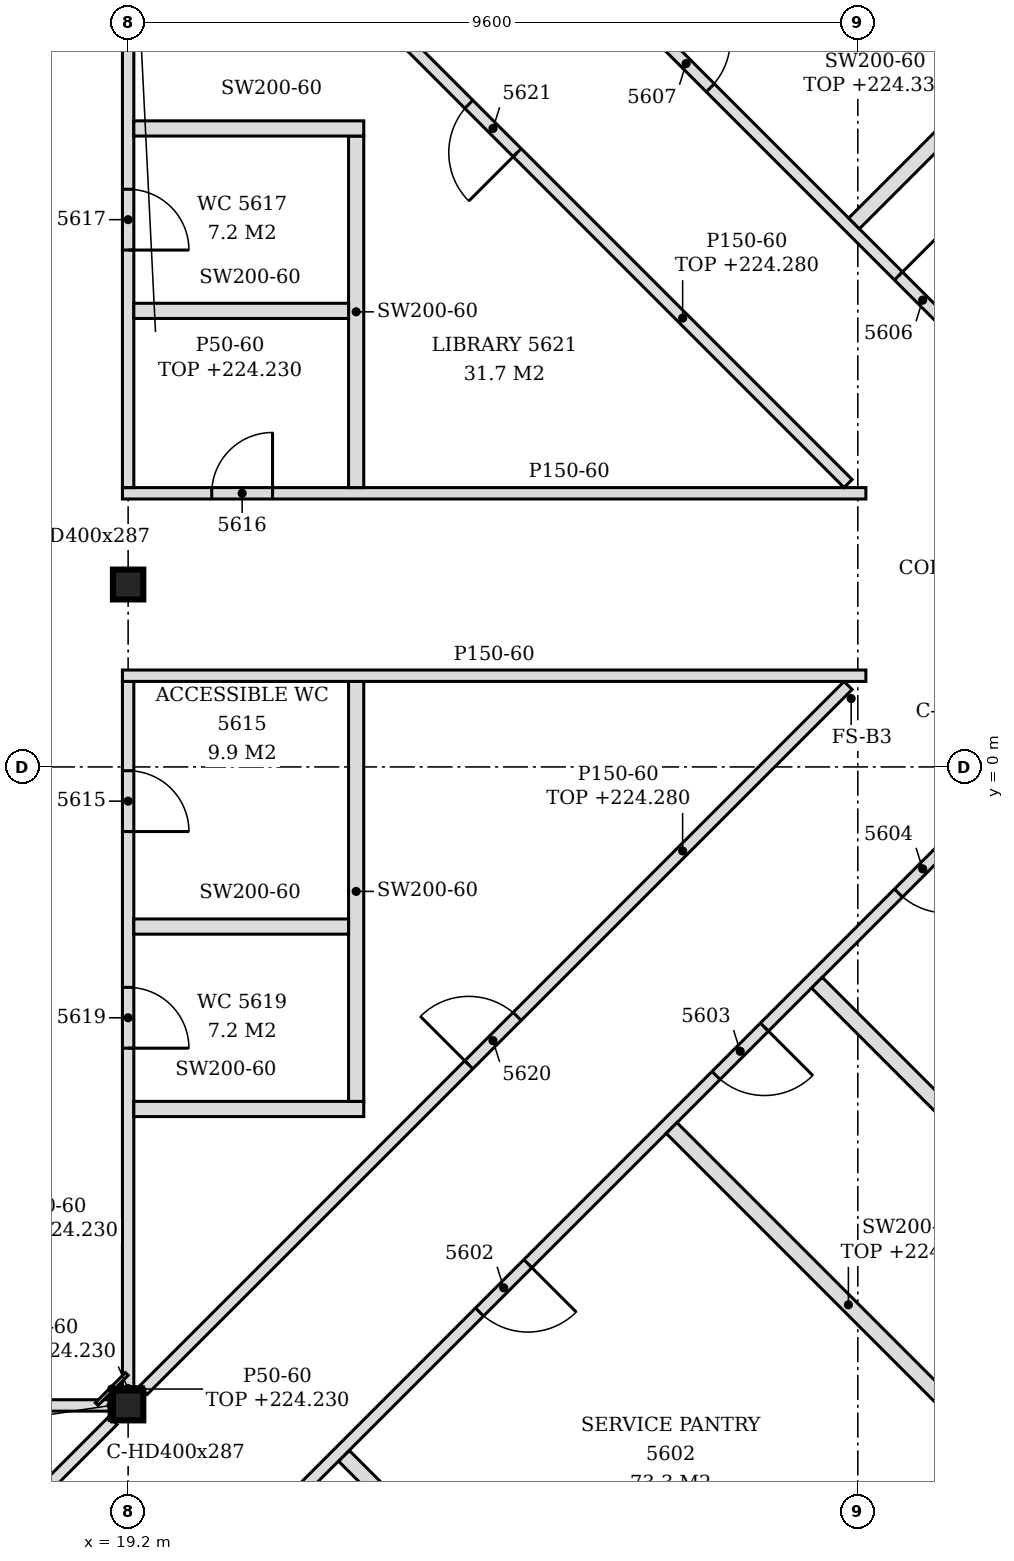
"""IFC4 building model, lengths in metres.
Left out: names, types, materials, properties, quantities, classifications, styles, units other than length and angle.
Written with IfcOpenShell. Run it as: python <this file> out.ifc"""

import sys

from ifc_helpers import new_model, si_unit, direction, frame, frame_2d, origin, origin_2d, place, context, subcontext, project, spatial, polyline, rectangle, i_section, outline, extrude, element, fill, save


model = new_model("IFC4")
c1 = context("Model", 3, precision=1e-05, world=origin(), true_north=direction((0.0, 1.0)))
c2 = subcontext(c1, "Body", "Model", "MODEL_VIEW")
j1 = project(units=[si_unit("LENGTHUNIT", "METRE"), si_unit("PLANEANGLEUNIT", "RADIAN")], contexts=[c1])
p1 = place(None, origin())
s1 = spatial("IfcSite", under=j1, at=p1, CompositionType="ELEMENT")
p2 = place(p1, origin())
s2 = spatial("IfcBuilding", under=s1, at=p2, CompositionType="ELEMENT")
p3 = place(p2, frame((0.0, 0.0, 221.4)))
s3 = spatial("IfcBuildingStorey", under=s2, at=p3, CompositionType="ELEMENT", Elevation=221.4)
for number, where, z_axis, x_axis in (
    (1, (19.2, -8.4, -0.15), (0.0, 0.0, 1.0), (1.0, 0.0, 0.0)),
    (2, (19.2, 2.4, -0.15), (0.0, 0.0, 1.0), (1.0, 0.0, 0.0)),
):
    element("IfcColumn", number, at=place(p3, frame(where, z_axis=z_axis, x_axis=x_axis)), inside=s3, PredefinedType="COLUMN", context=c2, shape_type="SweptSolid", body=[
        extrude(i_section(OverallWidth=0.399, OverallDepth=0.393, WebThickness=0.023, FlangeThickness=0.037, FilletRadius=0.015, at=origin_2d()), origin(), (0.0, 0.0, 1.0), 3.6),
    ])
p4 = place(p3, frame((29.636, -16.66, 0.0), z_axis=(0.0, 0.0, 1.0), x_axis=(-0.707095420673, 0.707118141518, 0.0)))
e3 = element("IfcWall", 3, at=p4, inside=s3, PredefinedType="PARTITIONING", context=c2, shape_type="SweptSolid", body=[
    extrude(rectangle(XDim=10.745, YDim=0.2, at=frame_2d((5.373, 0.0))), origin(), (0.0, 0.0, 1.0), 2.88),
])
p5 = place(p3, frame((16.722, -14.272, 0.0), z_axis=(0.0, 0.0, 1.0), x_axis=(0.707106781187, 0.707106781187, 0.0)))
e4 = element("IfcWall", 4, at=p5, inside=s3, PredefinedType="PARTITIONING", context=c2, shape_type="SweptSolid", body=[
    extrude(rectangle(XDim=20.049, YDim=0.15, at=frame_2d((10.025, 0.0))), origin(), (0.0, 0.0, 1.0), 2.73),
])
p6 = place(p5, frame((4.892, 0.0, 0.0)))
e5 = element("IfcOpeningElement", 5, at=p6, cuts=e4, PredefinedType="OPENING", context=c2, shape_type="SweptSolid", body=[
    extrude(rectangle(XDim=0.9, YDim=2.1, at=frame_2d((0.45, 1.05))), frame((0.0, 0.085, 0.0), z_axis=(0.0, -1.0, 0.0), x_axis=(1.0, 0.0, 0.0)), (0.0, 0.0, 1.0), 0.17),
])
p7 = place(p5, frame((10.042, 0.0, 0.0)))
e6 = element("IfcOpeningElement", 6, at=p7, cuts=e4, PredefinedType="OPENING", context=c2, shape_type="SweptSolid", body=[
    extrude(rectangle(XDim=0.9, YDim=2.1, at=frame_2d((0.45, 1.05))), frame((0.0, 0.085, 0.0), z_axis=(0.0, -1.0, 0.0), x_axis=(1.0, 0.0, 0.0)), (0.0, 0.0, 1.0), 0.17),
])
p8 = place(p5, frame((14.443, 0.0, 0.0)))
e7 = element("IfcOpeningElement", 7, at=p8, cuts=e4, PredefinedType="OPENING", context=c2, shape_type="SweptSolid", body=[
    extrude(rectangle(XDim=0.9, YDim=2.1, at=frame_2d((0.45, 1.05))), frame((0.0, 0.085, 0.0), z_axis=(0.0, -1.0, 0.0), x_axis=(1.0, 0.0, 0.0)), (0.0, 0.0, 1.0), 0.17),
])
p9 = place(p5, frame((17.837, 0.0, 0.0)))
e8 = element("IfcOpeningElement", 8, at=p9, cuts=e4, PredefinedType="OPENING", context=c2, shape_type="SweptSolid", body=[
    extrude(rectangle(XDim=0.9, YDim=2.1, at=frame_2d((0.45, 1.05))), frame((0.0, 0.085, 0.0), z_axis=(0.0, -1.0, 0.0), x_axis=(1.0, 0.0, 0.0)), (0.0, 0.0, 1.0), 0.17),
])
p10 = place(p3, frame((15.728, -11.872, 0.0), z_axis=(0.0, 0.0, 1.0), x_axis=(0.707080416772, 0.707133144618, 0.0)))
e9 = element("IfcWall", 9, at=p10, inside=s3, PredefinedType="PARTITIONING", context=c2, shape_type="SweptSolid", body=[
    extrude(rectangle(XDim=4.63, YDim=0.15, at=frame_2d((2.315, 0.0))), origin(), (0.0, 0.0, 1.0), 3.45),
])
p11 = place(p3, frame((35.86, -10.436, 0.0), z_axis=(0.0, 0.0, 1.0), x_axis=(-0.707106781187, 0.707106781187, 0.0)))
e10 = element("IfcWall", 10, at=p11, inside=s3, PredefinedType="PARTITIONING", context=c2, shape_type="SweptSolid", body=[
    extrude(rectangle(XDim=10.745, YDim=0.2, at=frame_2d((5.373, 0.0))), origin(), (0.0, 0.0, 1.0), 2.88),
])
p12 = place(p3, frame((31.002, -9.402, 0.0), z_axis=(0.0, 0.0, 1.0), x_axis=(-0.707088226093, 0.707125335793, 0.0)))
e11 = element("IfcWall", 11, at=p12, inside=s3, PredefinedType="PARTITIONING", context=c2, shape_type="SweptSolid", body=[
    extrude(rectangle(XDim=6.579, YDim=0.2, at=frame_2d((3.29, 0.0))), origin(), (0.0, 0.0, 1.0), 2.88),
])
p13 = place(p3, frame((7.399, -8.4, 0.0), z_axis=(0.0, 0.0, 1.0), x_axis=(1.0, 0.0, 0.0)))
e12 = element("IfcWall", 12, at=p13, inside=s3, PredefinedType="PARTITIONING", context=c2, shape_type="SweptSolid", body=[
    extrude(rectangle(XDim=11.601, YDim=0.15, at=frame_2d((5.801, 0.0))), origin(), (0.0, 0.0, 1.0), 2.83),
])
p14 = place(p13, frame((5.351, 0.0, 0.0)))
e13 = element("IfcOpeningElement", 13, at=p14, cuts=e12, PredefinedType="OPENING", context=c2, shape_type="SweptSolid", body=[
    extrude(rectangle(XDim=0.9, YDim=2.1, at=frame_2d((0.45, 1.05))), frame((0.0, 0.085, 0.0), z_axis=(0.0, -1.0, 0.0), x_axis=(1.0, 0.0, 0.0)), (0.0, 0.0, 1.0), 0.17),
])
p15 = place(p3, frame((19.2, -8.204, 0.0), z_axis=(0.0, 0.0, 1.0), x_axis=(0.0, 1.0, 0.0)))
e14 = element("IfcWall", 14, at=p15, inside=s3, PredefinedType="PARTITIONING", context=c2, shape_type="SweptSolid", body=[
    extrude(rectangle(XDim=9.329, YDim=0.15, at=frame_2d((4.664, 0.0))), origin(), (0.0, 0.0, 1.0), 2.83),
])
p16 = place(p15, frame((7.354, 0.0, 0.0)))
e15 = element("IfcOpeningElement", 15, at=p16, cuts=e14, PredefinedType="OPENING", context=c2, shape_type="SweptSolid", body=[
    extrude(rectangle(XDim=0.8, YDim=2.1, at=frame_2d((0.4, 1.05))), frame((0.0, 0.085, 0.0), z_axis=(0.0, -1.0, 0.0), x_axis=(1.0, 0.0, 0.0)), (0.0, 0.0, 1.0), 0.17),
])
p17 = place(p15, frame((4.503, 0.0, 0.0)))
e16 = element("IfcOpeningElement", 16, at=p17, cuts=e14, PredefinedType="OPENING", context=c2, shape_type="SweptSolid", body=[
    extrude(rectangle(XDim=0.8, YDim=2.1, at=frame_2d((0.4, 1.05))), frame((0.0, 0.085, 0.0), z_axis=(0.0, -1.0, 0.0), x_axis=(1.0, 0.0, 0.0)), (0.0, 0.0, 1.0), 0.17),
])
p18 = place(p3, frame((19.398, -8.202, 0.0), z_axis=(0.0, 0.0, 1.0), x_axis=(0.707116088468, 0.707097473782, 0.0)))
e17 = element("IfcWall", 17, at=p18, inside=s3, PredefinedType="PARTITIONING", context=c2, shape_type="SweptSolid", body=[
    extrude(rectangle(XDim=13.115, YDim=0.15, at=frame_2d((6.558, 0.0))), origin(), (0.0, 0.0, 1.0), 2.88),
])
p19 = place(p18, frame((6.058, 0.0, 0.0)))
e18 = element("IfcOpeningElement", 18, at=p19, cuts=e17, PredefinedType="OPENING", context=c2, shape_type="SweptSolid", body=[
    extrude(rectangle(XDim=0.9, YDim=2.1, at=frame_2d((0.45, 1.05))), frame((0.0, 0.085, 0.0), z_axis=(0.0, -1.0, 0.0), x_axis=(1.0, 0.0, 0.0)), (0.0, 0.0, 1.0), 0.17),
])
p20 = place(p3, frame((19.275, -4.5, 0.0), z_axis=(0.0, 0.0, 1.0), x_axis=(1.0, 0.0, 0.0)))
e19 = element("IfcWall", 19, at=p20, inside=s3, PredefinedType="PARTITIONING", context=c2, shape_type="SweptSolid", body=[
    extrude(outline(polyline([(0.0, 0.0), (3.025, 0.0), (3.025, 3.45), (0.075, 3.45), (0.073, 2.83), (0.0, 2.83), (0.0, 0.0)])), frame((0.0, 0.1, 0.0), z_axis=(0.0, -1.0, 0.0), x_axis=(1.0, 0.0, 0.0)), (0.0, 0.0, 1.0), 0.2),
])
p21 = place(p3, frame((22.2, -4.4, 0.0), z_axis=(0.0, 0.0, 1.0), x_axis=(0.0, 1.0, 0.0)))
e20 = element("IfcWall", 20, at=p21, inside=s3, PredefinedType="PARTITIONING", context=c2, shape_type="SweptSolid", body=[
    extrude(outline(polyline([(0.0, 0.0), (5.525, 0.0), (5.525, 3.45), (4.505, 3.45), (4.503, 2.88), (4.295, 2.88), (4.293, 3.45), (0.0, 3.45), (0.0, 0.0)])), frame((0.0, 0.1, 0.0), z_axis=(0.0, -1.0, 0.0), x_axis=(1.0, 0.0, 0.0)), (0.0, 0.0, 1.0), 0.2),
])
p22 = place(p3, frame((19.275, -2.1, 0.0), z_axis=(0.0, 0.0, 1.0), x_axis=(1.0, 0.0, 0.0)))
e21 = element("IfcWall", 21, at=p22, inside=s3, PredefinedType="PARTITIONING", context=c2, shape_type="SweptSolid", body=[
    extrude(outline(polyline([(0.0, 0.0), (2.825, 0.0), (2.825, 3.45), (0.075, 3.45), (0.073, 2.83), (0.0, 2.83), (0.0, 0.0)])), frame((0.0, 0.1, 0.0), z_axis=(0.0, -1.0, 0.0), x_axis=(1.0, 0.0, 0.0)), (0.0, 0.0, 1.0), 0.2),
])
p23 = place(p3, frame((19.125, 1.2, 0.0), z_axis=(0.0, 0.0, 1.0), x_axis=(1.0, 0.0, 0.0)))
e22 = element("IfcWall", 22, at=p23, inside=s3, PredefinedType="PARTITIONING", context=c2, shape_type="SweptSolid", body=[
    extrude(outline(polyline([(0.0, 0.0), (9.781, 0.0), (9.781, 3.45), (0.225, 3.45), (0.223, 2.83), (0.0, 2.83), (0.0, 0.0)])), frame((0.0, 0.075, 0.0), z_axis=(0.0, -1.0, 0.0), x_axis=(1.0, 0.0, 0.0)), (0.0, 0.0, 1.0), 0.15),
])
p24 = place(p3, frame((33.341, 2.453, 0.0), z_axis=(0.0, 0.0, 1.0), x_axis=(-0.707098652635, 0.707114909645, 0.0)))
e23 = element("IfcWall", 23, at=p24, inside=s3, PredefinedType="PARTITIONING", context=c2, shape_type="SweptSolid", body=[
    extrude(rectangle(XDim=15.018, YDim=0.15, at=frame_2d((7.509, 0.0))), origin(), (0.0, 0.0, 1.0), 2.88),
])
p25 = place(p24, frame((4.766, 0.0, 0.0)))
e24 = element("IfcOpeningElement", 24, at=p25, cuts=e23, PredefinedType="OPENING", context=c2, shape_type="SweptSolid", body=[
    extrude(rectangle(XDim=0.9, YDim=2.1, at=frame_2d((0.45, 1.05))), frame((0.0, 0.085, 0.0), z_axis=(0.0, -1.0, 0.0), x_axis=(1.0, 0.0, 0.0)), (0.0, 0.0, 1.0), 0.17),
])
p26 = place(p24, frame((9.167, 0.0, 0.0)))
e25 = element("IfcOpeningElement", 25, at=p26, cuts=e23, PredefinedType="OPENING", context=c2, shape_type="SweptSolid", body=[
    extrude(rectangle(XDim=0.9, YDim=2.1, at=frame_2d((0.45, 1.05))), frame((0.0, 0.085, 0.0), z_axis=(0.0, -1.0, 0.0), x_axis=(1.0, 0.0, 0.0)), (0.0, 0.0, 1.0), 0.17),
])
p27 = place(p24, frame((13.482, 0.0, 0.0)))
e26 = element("IfcOpeningElement", 26, at=p27, cuts=e23, PredefinedType="OPENING", context=c2, shape_type="SweptSolid", body=[
    extrude(rectangle(XDim=0.9, YDim=2.1, at=frame_2d((0.45, 1.05))), frame((0.0, 0.085, 0.0), z_axis=(0.0, -1.0, 0.0), x_axis=(1.0, 0.0, 0.0)), (0.0, 0.0, 1.0), 0.17),
])
p28 = place(p3, frame((19.125, 3.6, 0.0), z_axis=(0.0, 0.0, 1.0), x_axis=(1.0, 0.0, 0.0)))
e27 = element("IfcWall", 27, at=p28, inside=s3, PredefinedType="PARTITIONING", context=c2, shape_type="SweptSolid", body=[
    extrude(outline(polyline([(0.0, 0.0), (9.781, 0.0), (9.781, 3.45), (0.225, 3.45), (0.223, 2.83), (0.0, 2.83), (0.0, 0.0)])), frame((0.0, 0.075, 0.0), z_axis=(0.0, -1.0, 0.0), x_axis=(1.0, 0.0, 0.0)), (0.0, 0.0, 1.0), 0.15),
])
p29 = place(p28, frame((1.175, 0.0, 0.0)))
e28 = element("IfcOpeningElement", 28, at=p29, cuts=e27, PredefinedType="OPENING", context=c2, shape_type="SweptSolid", body=[
    extrude(rectangle(XDim=0.8, YDim=2.1, at=frame_2d((0.4, 1.05))), frame((0.0, 0.085, 0.0), z_axis=(0.0, -1.0, 0.0), x_axis=(1.0, 0.0, 0.0)), (0.0, 0.0, 1.0), 0.17),
])
p30 = place(p3, frame((19.2, 3.675, 0.0), z_axis=(0.0, 0.0, 1.0), x_axis=(0.0, 1.0, 0.0)))
e29 = element("IfcWall", 29, at=p30, inside=s3, PredefinedType="PARTITIONING", context=c2, shape_type="SweptSolid", body=[
    extrude(rectangle(XDim=9.328, YDim=0.15, at=frame_2d((4.664, 0.0))), origin(), (0.0, 0.0, 1.0), 2.83),
])
p31 = place(p30, frame((3.125, 0.0, 0.0)))
e30 = element("IfcOpeningElement", 30, at=p31, cuts=e29, PredefinedType="OPENING", context=c2, shape_type="SweptSolid", body=[
    extrude(rectangle(XDim=0.8, YDim=2.1, at=frame_2d((0.4, 1.05))), frame((0.0, 0.085, 0.0), z_axis=(0.0, -1.0, 0.0), x_axis=(1.0, 0.0, 0.0)), (0.0, 0.0, 1.0), 0.17),
])
p32 = place(p3, frame((22.2, 3.675, 0.0), z_axis=(0.0, 0.0, 1.0), x_axis=(0.0, 1.0, 0.0)))
e31 = element("IfcWall", 31, at=p32, inside=s3, PredefinedType="PARTITIONING", context=c2, shape_type="SweptSolid", body=[
    extrude(outline(polyline([(0.0, 0.0), (4.625, 0.0), (4.625, 3.45), (1.23, 3.45), (1.228, 2.88), (1.02, 2.88), (1.018, 3.45), (0.0, 3.45), (0.0, 0.0)])), frame((0.0, 0.1, 0.0), z_axis=(0.0, -1.0, 0.0), x_axis=(1.0, 0.0, 0.0)), (0.0, 0.0, 1.0), 0.2),
])
p33 = place(p3, frame((28.672, 3.728, 0.0), z_axis=(0.0, 0.0, 1.0), x_axis=(-0.707116088468, 0.707097473782, 0.0)))
e32 = element("IfcWall", 32, at=p33, inside=s3, PredefinedType="PARTITIONING", context=c2, shape_type="SweptSolid", body=[
    extrude(rectangle(XDim=13.115, YDim=0.15, at=frame_2d((6.558, 0.0))), origin(), (0.0, 0.0, 1.0), 2.88),
])
p34 = place(p33, frame((6.157, 0.0, 0.0)))
e33 = element("IfcOpeningElement", 33, at=p34, cuts=e32, PredefinedType="OPENING", context=c2, shape_type="SweptSolid", body=[
    extrude(rectangle(XDim=0.9, YDim=2.1, at=frame_2d((0.45, 1.05))), frame((0.0, 0.085, 0.0), z_axis=(0.0, -1.0, 0.0), x_axis=(1.0, 0.0, 0.0)), (0.0, 0.0, 1.0), 0.17),
])
p35 = place(p3, frame((19.275, 6.0, 0.0), z_axis=(0.0, 0.0, 1.0), x_axis=(1.0, 0.0, 0.0)))
e34 = element("IfcWall", 34, at=p35, inside=s3, PredefinedType="PARTITIONING", context=c2, shape_type="SweptSolid", body=[
    extrude(outline(polyline([(0.0, 0.0), (2.825, 0.0), (2.825, 3.45), (0.075, 3.45), (0.073, 2.83), (0.0, 2.83), (0.0, 0.0)])), frame((0.0, 0.1, 0.0), z_axis=(0.0, -1.0, 0.0), x_axis=(1.0, 0.0, 0.0)), (0.0, 0.0, 1.0), 0.2),
])
p36 = place(p3, frame((28.75, 7.15, 0.0), z_axis=(0.0, 0.0, 1.0), x_axis=(0.7070684525, 0.707145107796, 0.0)))
e35 = element("IfcWall", 35, at=p36, inside=s3, PredefinedType="PARTITIONING", context=c2, shape_type="SweptSolid", body=[
    extrude(rectangle(XDim=3.185, YDim=0.2, at=frame_2d((1.592, 0.0))), origin(), (0.0, 0.0, 1.0), 2.93),
])
p37 = place(p3, frame((19.275, 8.4, 0.0), z_axis=(0.0, 0.0, 1.0), x_axis=(1.0, 0.0, 0.0)))
e36 = element("IfcWall", 36, at=p37, inside=s3, PredefinedType="PARTITIONING", context=c2, shape_type="SweptSolid", body=[
    extrude(outline(polyline([(0.0, 0.0), (3.025, 0.0), (3.025, 3.45), (0.075, 3.45), (0.073, 2.83), (0.0, 2.83), (0.0, 0.0)])), frame((0.0, 0.1, 0.0), z_axis=(0.0, -1.0, 0.0), x_axis=(1.0, 0.0, 0.0)), (0.0, 0.0, 1.0), 0.2),
])
p38 = place(p3, frame((18.786, -8.382, 0.0), z_axis=(0.0, 0.0, 1.0), x_axis=(0.707106781187, 0.707106781187, 0.0)))
e37 = element("IfcWall", 37, at=p38, inside=s3, PredefinedType="PARTITIONING", context=c2, shape_type="SweptSolid", body=[
    extrude(rectangle(XDim=0.56, YDim=0.05, at=frame_2d((0.28, 0.0))), origin(), (0.0, 0.0, 1.0), 2.83),
])
p39 = place(p3, frame((19.0, -8.178, 0.0), z_axis=(0.0, 0.0, 1.0), x_axis=(1.0, 0.0, 0.0)))
e38 = element("IfcWall", 38, at=p39, inside=s3, PredefinedType="PARTITIONING", context=c2, shape_type="SweptSolid", body=[
    extrude(rectangle(XDim=0.399, YDim=0.05, at=frame_2d((0.199, 0.0))), origin(), (0.0, 0.0, 1.0), 2.83),
])
p40 = place(p3, frame((18.976, -8.596, 0.0), z_axis=(0.0, 0.0, 1.0), x_axis=(0.0, 1.0, 0.0)))
e39 = element("IfcWall", 39, at=p40, inside=s3, PredefinedType="PARTITIONING", context=c2, shape_type="SweptSolid", body=[
    extrude(rectangle(XDim=0.393, YDim=0.05, at=frame_2d((0.196, 0.0))), origin(), (0.0, 0.0, 1.0), 2.83),
])
p41 = place(p7, frame((0.9, 0.0, 0.0), z_axis=(0.0, 0.0, 1.0), x_axis=(-1.0, 0.0, 0.0)))
e40 = element("IfcDoor", 40, at=p41, inside=s3, OperationType="SINGLE_SWING_LEFT", PredefinedType="DOOR", context=c2, shape_type="SweptSolid", body=[
    extrude(rectangle(XDim=0.9, YDim=2.1, at=frame_2d((0.45, 1.05))), frame((0.0, 0.025, 0.0), z_axis=(0.0, -1.0, 0.0), x_axis=(1.0, 0.0, 0.0)), (0.0, 0.0, 1.0), 0.05),
])
fill(e6, e40)
p42 = place(p8, frame((0.9, 0.0, 0.0), z_axis=(0.0, 0.0, 1.0), x_axis=(-1.0, 0.0, 0.0)))
e41 = element("IfcDoor", 41, at=p42, inside=s3, OperationType="SINGLE_SWING_LEFT", PredefinedType="DOOR", context=c2, shape_type="SweptSolid", body=[
    extrude(rectangle(XDim=0.9, YDim=2.1, at=frame_2d((0.45, 1.05))), frame((0.0, 0.025, 0.0), z_axis=(0.0, -1.0, 0.0), x_axis=(1.0, 0.0, 0.0)), (0.0, 0.0, 1.0), 0.05),
])
fill(e7, e41)
p43 = place(p9, frame((0.9, 0.0, 0.0), z_axis=(0.0, 0.0, 1.0), x_axis=(-1.0, 0.0, 0.0)))
e42 = element("IfcDoor", 42, at=p43, inside=s3, OperationType="SINGLE_SWING_LEFT", PredefinedType="DOOR", context=c2, shape_type="SweptSolid", body=[
    extrude(rectangle(XDim=0.9, YDim=2.1, at=frame_2d((0.45, 1.05))), frame((0.0, 0.025, 0.0), z_axis=(0.0, -1.0, 0.0), x_axis=(1.0, 0.0, 0.0)), (0.0, 0.0, 1.0), 0.05),
])
fill(e8, e42)
p44 = place(p25, frame((0.9, 0.0, 0.0), z_axis=(0.0, 0.0, 1.0), x_axis=(-1.0, 0.0, 0.0)))
e43 = element("IfcDoor", 43, at=p44, inside=s3, OperationType="SINGLE_SWING_LEFT", PredefinedType="DOOR", context=c2, shape_type="SweptSolid", body=[
    extrude(rectangle(XDim=0.9, YDim=2.1, at=frame_2d((0.45, 1.05))), frame((0.0, 0.025, 0.0), z_axis=(0.0, -1.0, 0.0), x_axis=(1.0, 0.0, 0.0)), (0.0, 0.0, 1.0), 0.05),
])
fill(e24, e43)
p45 = place(p26, frame((0.9, 0.0, 0.0), z_axis=(0.0, 0.0, 1.0), x_axis=(-1.0, 0.0, 0.0)))
e44 = element("IfcDoor", 44, at=p45, inside=s3, OperationType="SINGLE_SWING_LEFT", PredefinedType="DOOR", context=c2, shape_type="SweptSolid", body=[
    extrude(rectangle(XDim=0.9, YDim=2.1, at=frame_2d((0.45, 1.05))), frame((0.0, 0.025, 0.0), z_axis=(0.0, -1.0, 0.0), x_axis=(1.0, 0.0, 0.0)), (0.0, 0.0, 1.0), 0.05),
])
fill(e25, e44)
p46 = place(p16, frame((0.8, 0.0, 0.0), z_axis=(0.0, 0.0, 1.0), x_axis=(-1.0, 0.0, 0.0)))
e45 = element("IfcDoor", 45, at=p46, inside=s3, OperationType="SINGLE_SWING_RIGHT", PredefinedType="DOOR", context=c2, shape_type="SweptSolid", body=[
    extrude(rectangle(XDim=0.8, YDim=2.1, at=frame_2d((0.4, 1.05))), frame((0.0, 0.025, 0.0), z_axis=(0.0, -1.0, 0.0), x_axis=(1.0, 0.0, 0.0)), (0.0, 0.0, 1.0), 0.05),
])
fill(e15, e45)
p47 = place(p29, origin())
e46 = element("IfcDoor", 46, at=p47, inside=s3, OperationType="SINGLE_SWING_RIGHT", PredefinedType="DOOR", context=c2, shape_type="SweptSolid", body=[
    extrude(rectangle(XDim=0.8, YDim=2.1, at=frame_2d((0.4, 1.05))), frame((0.0, 0.025, 0.0), z_axis=(0.0, -1.0, 0.0), x_axis=(1.0, 0.0, 0.0)), (0.0, 0.0, 1.0), 0.05),
])
fill(e28, e46)
p48 = place(p31, frame((0.8, 0.0, 0.0), z_axis=(0.0, 0.0, 1.0), x_axis=(-1.0, 0.0, 0.0)))
e47 = element("IfcDoor", 47, at=p48, inside=s3, OperationType="SINGLE_SWING_RIGHT", PredefinedType="DOOR", context=c2, shape_type="SweptSolid", body=[
    extrude(rectangle(XDim=0.8, YDim=2.1, at=frame_2d((0.4, 1.05))), frame((0.0, 0.025, 0.0), z_axis=(0.0, -1.0, 0.0), x_axis=(1.0, 0.0, 0.0)), (0.0, 0.0, 1.0), 0.05),
])
fill(e30, e47)
p49 = place(p17, frame((0.8, 0.0, 0.0), z_axis=(0.0, 0.0, 1.0), x_axis=(-1.0, 0.0, 0.0)))
e48 = element("IfcDoor", 48, at=p49, inside=s3, OperationType="SINGLE_SWING_RIGHT", PredefinedType="DOOR", context=c2, shape_type="SweptSolid", body=[
    extrude(rectangle(XDim=0.8, YDim=2.1, at=frame_2d((0.4, 1.05))), frame((0.0, 0.025, 0.0), z_axis=(0.0, -1.0, 0.0), x_axis=(1.0, 0.0, 0.0)), (0.0, 0.0, 1.0), 0.05),
])
fill(e16, e48)
p50 = place(p19, origin())
e49 = element("IfcDoor", 49, at=p50, inside=s3, OperationType="SINGLE_SWING_LEFT", PredefinedType="DOOR", context=c2, shape_type="SweptSolid", body=[
    extrude(rectangle(XDim=0.9, YDim=2.1, at=frame_2d((0.45, 1.05))), frame((0.0, 0.025, 0.0), z_axis=(0.0, -1.0, 0.0), x_axis=(1.0, 0.0, 0.0)), (0.0, 0.0, 1.0), 0.05),
])
fill(e18, e49)
p51 = place(p34, origin())
e50 = element("IfcDoor", 50, at=p51, inside=s3, OperationType="SINGLE_SWING_LEFT", PredefinedType="DOOR", context=c2, shape_type="SweptSolid", body=[
    extrude(rectangle(XDim=0.9, YDim=2.1, at=frame_2d((0.45, 1.05))), frame((0.0, 0.025, 0.0), z_axis=(0.0, -1.0, 0.0), x_axis=(1.0, 0.0, 0.0)), (0.0, 0.0, 1.0), 0.05),
])
fill(e33, e50)
save(model, sys.argv[1])
